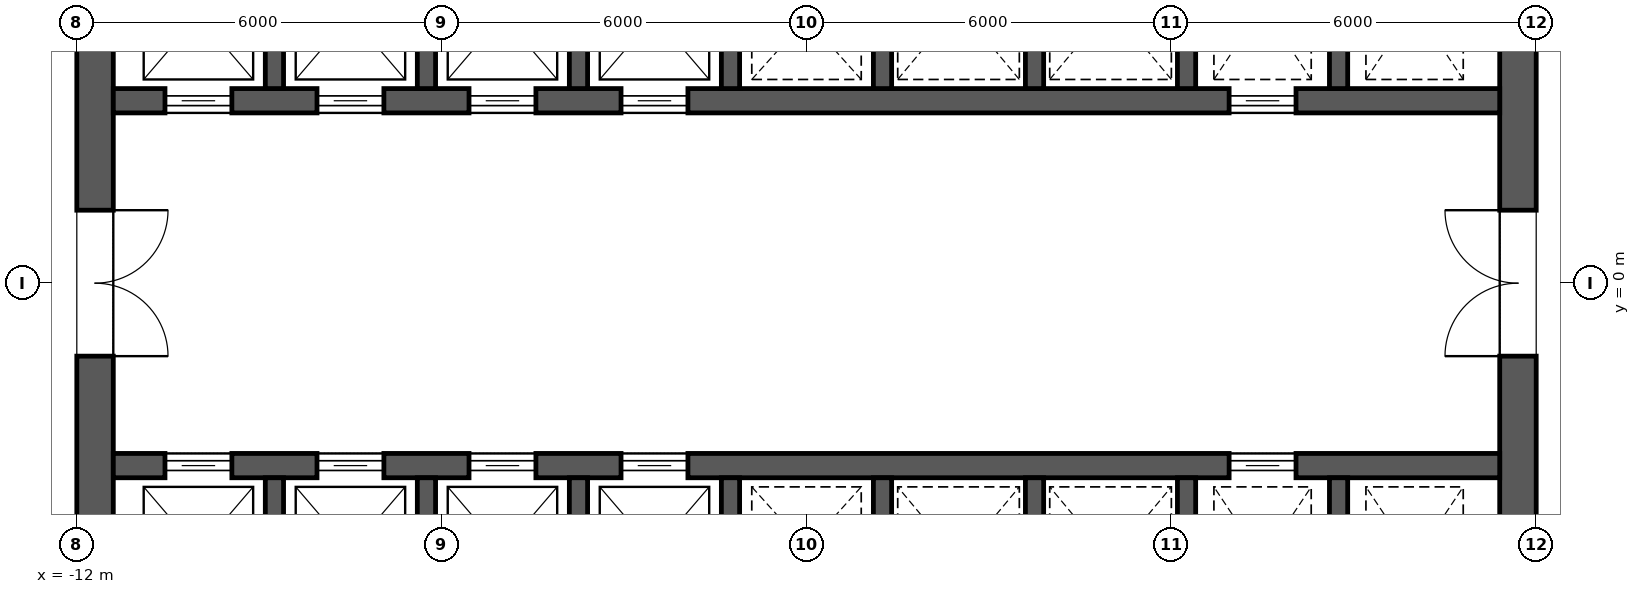
"""IFC4 building model, lengths in metres.
Left out: names, types, materials, properties, quantities, classifications, styles, units other than length and angle.
Written with IfcOpenShell. Run it as: python <this file> out.ifc"""

import sys

from ifc_helpers import new_model, si_unit, direction, frame, frame_2d, origin, place, context, subcontext, project, spatial, rectangle, extrude, element, fill, save


model = new_model("IFC4")
c1 = context("Model", 3, precision=1e-05, world=origin(), true_north=direction((0.0, 1.0)))
c2 = subcontext(c1, "Body", "Model", "MODEL_VIEW")
j1 = project(units=[si_unit("LENGTHUNIT", "METRE"), si_unit("PLANEANGLEUNIT", "RADIAN")], contexts=[c1])
p1 = place(None, origin())
s1 = spatial("IfcSite", under=j1, at=p1, CompositionType="ELEMENT")
p2 = place(p1, origin())
s2 = spatial("IfcBuilding", under=s1, at=p2, CompositionType="ELEMENT")
p3 = place(p2, frame((0.0, 0.0, 104.5)))
s3 = spatial("IfcBuildingStorey", under=s2, at=p3, CompositionType="ELEMENT", Elevation=104.5)
p4 = place(p3, frame((11.7, -11.4, 0.0), z_axis=(0.0, 0.0, 1.0), x_axis=(0.0, 1.0, 0.0)))
e1 = element("IfcWall", 1, at=p4, inside=s3, PredefinedType="SHEAR", context=c2, shape_type="SweptSolid", body=[
    extrude(rectangle(XDim=22.8, YDim=0.6, at=frame_2d((11.4, 0.0))), origin(), (0.0, 0.0, 1.0), 4.2),
])
p5 = place(p4, frame((10.2, 0.0, 0.0)))
e2 = element("IfcOpeningElement", 2, at=p5, cuts=e1, PredefinedType="OPENING", context=c2, shape_type="SweptSolid", body=[
    extrude(rectangle(XDim=2.4, YDim=2.1, at=frame_2d((1.2, 1.05))), frame((0.0, 0.312, 0.0), z_axis=(0.0, -1.0, 0.0), x_axis=(1.0, 0.0, 0.0)), (0.0, 0.0, 1.0), 0.624),
])
p6 = place(p4, frame((19.5, 0.0, 0.0)))
e3 = element("IfcOpeningElement", 3, at=p6, cuts=e1, PredefinedType="OPENING", context=c2, shape_type="SweptSolid", body=[
    extrude(rectangle(XDim=1.2, YDim=2.1, at=frame_2d((0.6, 1.05))), frame((0.0, 0.312, 0.0), z_axis=(0.0, -1.0, 0.0), x_axis=(1.0, 0.0, 0.0)), (0.0, 0.0, 1.0), 0.624),
])
p7 = place(p4, frame((2.1, 0.0, 0.0)))
e4 = element("IfcOpeningElement", 4, at=p7, cuts=e1, PredefinedType="OPENING", context=c2, shape_type="SweptSolid", body=[
    extrude(rectangle(XDim=1.2, YDim=2.1, at=frame_2d((0.6, 1.05))), frame((0.0, 0.312, 0.0), z_axis=(0.0, -1.0, 0.0), x_axis=(1.0, 0.0, 0.0)), (0.0, 0.0, 1.0), 0.624),
])
p8 = place(p3, frame((-11.7, -11.4, 0.0), z_axis=(0.0, 0.0, 1.0), x_axis=(0.0, 1.0, 0.0)))
e5 = element("IfcWall", 5, at=p8, inside=s3, PredefinedType="SHEAR", context=c2, shape_type="SweptSolid", body=[
    extrude(rectangle(XDim=22.8, YDim=0.6, at=frame_2d((11.4, 0.0))), origin(), (0.0, 0.0, 1.0), 4.2),
])
p9 = place(p8, frame((10.2, 0.0, 0.0)))
e6 = element("IfcOpeningElement", 6, at=p9, cuts=e5, PredefinedType="OPENING", context=c2, shape_type="SweptSolid", body=[
    extrude(rectangle(XDim=2.4, YDim=2.1, at=frame_2d((1.2, 1.05))), frame((0.0, 0.312, 0.0), z_axis=(0.0, -1.0, 0.0), x_axis=(1.0, 0.0, 0.0)), (0.0, 0.0, 1.0), 0.624),
])
p10 = place(p8, frame((18.925, 0.0, 0.0)))
e7 = element("IfcOpeningElement", 7, at=p10, cuts=e5, PredefinedType="OPENING", context=c2, shape_type="SweptSolid", body=[
    extrude(rectangle(XDim=1.2, YDim=2.1, at=frame_2d((0.6, 1.05))), frame((0.0, 0.312, 0.0), z_axis=(0.0, -1.0, 0.0), x_axis=(1.0, 0.0, 0.0)), (0.0, 0.0, 1.0), 0.624),
])
p11 = place(p8, frame((2.675, 0.0, 0.0)))
e8 = element("IfcOpeningElement", 8, at=p11, cuts=e5, PredefinedType="OPENING", context=c2, shape_type="SweptSolid", body=[
    extrude(rectangle(XDim=1.2, YDim=2.1, at=frame_2d((0.6, 1.05))), frame((0.0, 0.312, 0.0), z_axis=(0.0, -1.0, 0.0), x_axis=(1.0, 0.0, 0.0)), (0.0, 0.0, 1.0), 0.624),
])
p12 = place(p3, frame((-11.4, 3.0, 0.0), z_axis=(0.0, 0.0, 1.0), x_axis=(1.0, 0.0, 0.0)))
e9 = element("IfcWall", 9, at=p12, inside=s3, PredefinedType="SHEAR", context=c2, shape_type="SweptSolid", body=[
    extrude(rectangle(XDim=22.8, YDim=0.4, at=frame_2d((11.4, 0.0))), origin(), (0.0, 0.0, 1.0), 4.2),
])
p13 = place(p12, frame((0.85, 0.0, 0.0)))
e10 = element("IfcOpeningElement", 10, at=p13, cuts=e9, PredefinedType="OPENING", context=c2, shape_type="SweptSolid", body=[
    extrude(rectangle(XDim=1.1, YDim=2.1, at=frame_2d((0.55, 1.05))), frame((0.0, 0.212, 0.0), z_axis=(0.0, -1.0, 0.0), x_axis=(1.0, 0.0, 0.0)), (0.0, 0.0, 1.0), 0.424),
])
p14 = place(p12, frame((3.35, 0.0, 0.0)))
e11 = element("IfcOpeningElement", 11, at=p14, cuts=e9, PredefinedType="OPENING", context=c2, shape_type="SweptSolid", body=[
    extrude(rectangle(XDim=1.1, YDim=2.1, at=frame_2d((0.55, 1.05))), frame((0.0, 0.212, 0.0), z_axis=(0.0, -1.0, 0.0), x_axis=(1.0, 0.0, 0.0)), (0.0, 0.0, 1.0), 0.424),
])
p15 = place(p12, frame((5.85, 0.0, 0.0)))
e12 = element("IfcOpeningElement", 12, at=p15, cuts=e9, PredefinedType="OPENING", context=c2, shape_type="SweptSolid", body=[
    extrude(rectangle(XDim=1.1, YDim=2.1, at=frame_2d((0.55, 1.05))), frame((0.0, 0.212, 0.0), z_axis=(0.0, -1.0, 0.0), x_axis=(1.0, 0.0, 0.0)), (0.0, 0.0, 1.0), 0.424),
])
p16 = place(p12, frame((8.35, 0.0, 0.0)))
e13 = element("IfcOpeningElement", 13, at=p16, cuts=e9, PredefinedType="OPENING", context=c2, shape_type="SweptSolid", body=[
    extrude(rectangle(XDim=1.1, YDim=2.1, at=frame_2d((0.55, 1.05))), frame((0.0, 0.212, 0.0), z_axis=(0.0, -1.0, 0.0), x_axis=(1.0, 0.0, 0.0)), (0.0, 0.0, 1.0), 0.424),
])
p17 = place(p12, frame((18.35, 0.0, 0.0)))
e14 = element("IfcOpeningElement", 14, at=p17, cuts=e9, PredefinedType="OPENING", context=c2, shape_type="SweptSolid", body=[
    extrude(rectangle(XDim=1.1, YDim=2.1, at=frame_2d((0.55, 1.05))), frame((0.0, 0.212, 0.0), z_axis=(0.0, -1.0, 0.0), x_axis=(1.0, 0.0, 0.0)), (0.0, 0.0, 1.0), 0.424),
])
for number, where, z_axis, x_axis in (
    (15, (-8.75, 3.2, 0.0), (0.0, 0.0, 1.0), (0.0, 1.0, 0.0)),
    (16, (-6.25, 3.2, 0.0), (0.0, 0.0, 1.0), (0.0, 1.0, 0.0)),
    (17, (-3.75, 3.2, 0.0), (0.0, 0.0, 1.0), (0.0, 1.0, 0.0)),
    (18, (-1.25, 3.2, 0.0), (0.0, 0.0, 1.0), (0.0, 1.0, 0.0)),
    (19, (1.25, 3.2, 0.0), (0.0, 0.0, 1.0), (0.0, 1.0, 0.0)),
    (20, (3.75, 3.2, 0.0), (0.0, 0.0, 1.0), (0.0, 1.0, 0.0)),
    (21, (6.25, 3.2, 0.0), (0.0, 0.0, 1.0), (0.0, 1.0, 0.0)),
    (22, (8.75, 3.2, 0.0), (0.0, 0.0, 1.0), (0.0, 1.0, 0.0)),
):
    element("IfcWall", number, at=place(p3, frame(where, z_axis=z_axis, x_axis=x_axis)), inside=s3, PredefinedType="SHEAR", context=c2, shape_type="SweptSolid", body=[
        extrude(rectangle(XDim=2.9, YDim=0.3, at=frame_2d((1.45, 0.0))), origin(), (0.0, 0.0, 1.0), 4.2),
    ])
p18 = place(p3, frame((-11.4, -3.0, 0.0), z_axis=(0.0, 0.0, 1.0), x_axis=(1.0, 0.0, 0.0)))
e23 = element("IfcWall", 23, at=p18, inside=s3, PredefinedType="SHEAR", context=c2, shape_type="SweptSolid", body=[
    extrude(rectangle(XDim=22.8, YDim=0.4, at=frame_2d((11.4, 0.0))), origin(), (0.0, 0.0, 1.0), 4.2),
])
p19 = place(p18, frame((0.85, 0.0, 0.0)))
e24 = element("IfcOpeningElement", 24, at=p19, cuts=e23, PredefinedType="OPENING", context=c2, shape_type="SweptSolid", body=[
    extrude(rectangle(XDim=1.1, YDim=2.1, at=frame_2d((0.55, 1.05))), frame((0.0, 0.212, 0.0), z_axis=(0.0, -1.0, 0.0), x_axis=(1.0, 0.0, 0.0)), (0.0, 0.0, 1.0), 0.424),
])
p20 = place(p18, frame((3.35, 0.0, 0.0)))
e25 = element("IfcOpeningElement", 25, at=p20, cuts=e23, PredefinedType="OPENING", context=c2, shape_type="SweptSolid", body=[
    extrude(rectangle(XDim=1.1, YDim=2.1, at=frame_2d((0.55, 1.05))), frame((0.0, 0.212, 0.0), z_axis=(0.0, -1.0, 0.0), x_axis=(1.0, 0.0, 0.0)), (0.0, 0.0, 1.0), 0.424),
])
p21 = place(p18, frame((5.85, 0.0, 0.0)))
e26 = element("IfcOpeningElement", 26, at=p21, cuts=e23, PredefinedType="OPENING", context=c2, shape_type="SweptSolid", body=[
    extrude(rectangle(XDim=1.1, YDim=2.1, at=frame_2d((0.55, 1.05))), frame((0.0, 0.212, 0.0), z_axis=(0.0, -1.0, 0.0), x_axis=(1.0, 0.0, 0.0)), (0.0, 0.0, 1.0), 0.424),
])
p22 = place(p18, frame((8.35, 0.0, 0.0)))
e27 = element("IfcOpeningElement", 27, at=p22, cuts=e23, PredefinedType="OPENING", context=c2, shape_type="SweptSolid", body=[
    extrude(rectangle(XDim=1.1, YDim=2.1, at=frame_2d((0.55, 1.05))), frame((0.0, 0.212, 0.0), z_axis=(0.0, -1.0, 0.0), x_axis=(1.0, 0.0, 0.0)), (0.0, 0.0, 1.0), 0.424),
])
p23 = place(p18, frame((18.35, 0.0, 0.0)))
e28 = element("IfcOpeningElement", 28, at=p23, cuts=e23, PredefinedType="OPENING", context=c2, shape_type="SweptSolid", body=[
    extrude(rectangle(XDim=1.1, YDim=2.1, at=frame_2d((0.55, 1.05))), frame((0.0, 0.212, 0.0), z_axis=(0.0, -1.0, 0.0), x_axis=(1.0, 0.0, 0.0)), (0.0, 0.0, 1.0), 0.424),
])
for number, where, z_axis, x_axis in (
    (29, (-8.75, -6.1, 0.0), (0.0, 0.0, 1.0), (0.0, 1.0, 0.0)),
    (30, (-6.25, -6.1, 0.0), (0.0, 0.0, 1.0), (0.0, 1.0, 0.0)),
    (31, (-3.75, -6.1, 0.0), (0.0, 0.0, 1.0), (0.0, 1.0, 0.0)),
    (32, (-1.25, -6.1, 0.0), (0.0, 0.0, 1.0), (0.0, 1.0, 0.0)),
    (33, (1.25, -6.1, 0.0), (0.0, 0.0, 1.0), (0.0, 1.0, 0.0)),
    (34, (3.75, -6.1, 0.0), (0.0, 0.0, 1.0), (0.0, 1.0, 0.0)),
    (35, (6.25, -6.1, 0.0), (0.0, 0.0, 1.0), (0.0, 1.0, 0.0)),
    (36, (8.75, -6.1, 0.0), (0.0, 0.0, 1.0), (0.0, 1.0, 0.0)),
):
    element("IfcWall", number, at=place(p3, frame(where, z_axis=z_axis, x_axis=x_axis)), inside=s3, PredefinedType="SHEAR", context=c2, shape_type="SweptSolid", body=[
        extrude(rectangle(XDim=2.9, YDim=0.3, at=frame_2d((1.45, 0.0))), origin(), (0.0, 0.0, 1.0), 4.2),
    ])
p24 = place(p13, origin())
e37 = element("IfcDoor", 37, at=p24, inside=s3, OperationType="SLIDING_TO_LEFT", PredefinedType="DOOR", context=c2, shape_type="SweptSolid", body=[
    extrude(rectangle(XDim=1.1, YDim=2.1, at=frame_2d((0.55, 1.05))), frame((0.0, 0.025, 0.0), z_axis=(0.0, -1.0, 0.0), x_axis=(1.0, 0.0, 0.0)), (0.0, 0.0, 1.0), 0.05),
])
fill(e10, e37)
p25 = place(p14, origin())
e38 = element("IfcDoor", 38, at=p25, inside=s3, OperationType="SLIDING_TO_LEFT", PredefinedType="DOOR", context=c2, shape_type="SweptSolid", body=[
    extrude(rectangle(XDim=1.1, YDim=2.1, at=frame_2d((0.55, 1.05))), frame((0.0, 0.025, 0.0), z_axis=(0.0, -1.0, 0.0), x_axis=(1.0, 0.0, 0.0)), (0.0, 0.0, 1.0), 0.05),
])
fill(e11, e38)
p26 = place(p15, origin())
e39 = element("IfcDoor", 39, at=p26, inside=s3, OperationType="SLIDING_TO_LEFT", PredefinedType="DOOR", context=c2, shape_type="SweptSolid", body=[
    extrude(rectangle(XDim=1.1, YDim=2.1, at=frame_2d((0.55, 1.05))), frame((0.0, 0.025, 0.0), z_axis=(0.0, -1.0, 0.0), x_axis=(1.0, 0.0, 0.0)), (0.0, 0.0, 1.0), 0.05),
])
fill(e12, e39)
p27 = place(p16, origin())
e40 = element("IfcDoor", 40, at=p27, inside=s3, OperationType="SLIDING_TO_LEFT", PredefinedType="DOOR", context=c2, shape_type="SweptSolid", body=[
    extrude(rectangle(XDim=1.1, YDim=2.1, at=frame_2d((0.55, 1.05))), frame((0.0, 0.025, 0.0), z_axis=(0.0, -1.0, 0.0), x_axis=(1.0, 0.0, 0.0)), (0.0, 0.0, 1.0), 0.05),
])
fill(e13, e40)
p28 = place(p19, origin())
e41 = element("IfcDoor", 41, at=p28, inside=s3, OperationType="SLIDING_TO_LEFT", PredefinedType="DOOR", context=c2, shape_type="SweptSolid", body=[
    extrude(rectangle(XDim=1.1, YDim=2.1, at=frame_2d((0.55, 1.05))), frame((0.0, 0.025, 0.0), z_axis=(0.0, -1.0, 0.0), x_axis=(1.0, 0.0, 0.0)), (0.0, 0.0, 1.0), 0.05),
])
fill(e24, e41)
p29 = place(p20, origin())
e42 = element("IfcDoor", 42, at=p29, inside=s3, OperationType="SLIDING_TO_LEFT", PredefinedType="DOOR", context=c2, shape_type="SweptSolid", body=[
    extrude(rectangle(XDim=1.1, YDim=2.1, at=frame_2d((0.55, 1.05))), frame((0.0, 0.025, 0.0), z_axis=(0.0, -1.0, 0.0), x_axis=(1.0, 0.0, 0.0)), (0.0, 0.0, 1.0), 0.05),
])
fill(e25, e42)
p30 = place(p21, origin())
e43 = element("IfcDoor", 43, at=p30, inside=s3, OperationType="SLIDING_TO_LEFT", PredefinedType="DOOR", context=c2, shape_type="SweptSolid", body=[
    extrude(rectangle(XDim=1.1, YDim=2.1, at=frame_2d((0.55, 1.05))), frame((0.0, 0.025, 0.0), z_axis=(0.0, -1.0, 0.0), x_axis=(1.0, 0.0, 0.0)), (0.0, 0.0, 1.0), 0.05),
])
fill(e26, e43)
p31 = place(p22, origin())
e44 = element("IfcDoor", 44, at=p31, inside=s3, OperationType="SLIDING_TO_LEFT", PredefinedType="DOOR", context=c2, shape_type="SweptSolid", body=[
    extrude(rectangle(XDim=1.1, YDim=2.1, at=frame_2d((0.55, 1.05))), frame((0.0, 0.025, 0.0), z_axis=(0.0, -1.0, 0.0), x_axis=(1.0, 0.0, 0.0)), (0.0, 0.0, 1.0), 0.05),
])
fill(e27, e44)
p32 = place(p17, origin())
e45 = element("IfcDoor", 45, at=p32, inside=s3, OperationType="SLIDING_TO_LEFT", PredefinedType="DOOR", context=c2, shape_type="SweptSolid", body=[
    extrude(rectangle(XDim=1.1, YDim=2.1, at=frame_2d((0.55, 1.05))), frame((0.0, 0.025, 0.0), z_axis=(0.0, -1.0, 0.0), x_axis=(1.0, 0.0, 0.0)), (0.0, 0.0, 1.0), 0.05),
])
fill(e14, e45)
p33 = place(p23, origin())
e46 = element("IfcDoor", 46, at=p33, inside=s3, OperationType="SLIDING_TO_LEFT", PredefinedType="DOOR", context=c2, shape_type="SweptSolid", body=[
    extrude(rectangle(XDim=1.1, YDim=2.1, at=frame_2d((0.55, 1.05))), frame((0.0, 0.025, 0.0), z_axis=(0.0, -1.0, 0.0), x_axis=(1.0, 0.0, 0.0)), (0.0, 0.0, 1.0), 0.05),
])
fill(e28, e46)
p34 = place(p9, frame((2.4, 0.0, 0.0), z_axis=(0.0, 0.0, 1.0), x_axis=(-1.0, 0.0, 0.0)))
e47 = element("IfcDoor", 47, at=p34, inside=s3, OperationType="DOUBLE_DOOR_SINGLE_SWING", PredefinedType="DOOR", context=c2, shape_type="SweptSolid", body=[
    extrude(rectangle(XDim=2.4, YDim=2.1, at=frame_2d((1.2, 1.05))), frame((0.0, 0.025, 0.0), z_axis=(0.0, -1.0, 0.0), x_axis=(1.0, 0.0, 0.0)), (0.0, 0.0, 1.0), 0.05),
])
fill(e6, e47)
p35 = place(p5, origin())
e48 = element("IfcDoor", 48, at=p35, inside=s3, OperationType="DOUBLE_DOOR_SINGLE_SWING", PredefinedType="DOOR", context=c2, shape_type="SweptSolid", body=[
    extrude(rectangle(XDim=2.4, YDim=2.1, at=frame_2d((1.2, 1.05))), frame((0.0, 0.025, 0.0), z_axis=(0.0, -1.0, 0.0), x_axis=(1.0, 0.0, 0.0)), (0.0, 0.0, 1.0), 0.05),
])
fill(e2, e48)
save(model, sys.argv[1])
